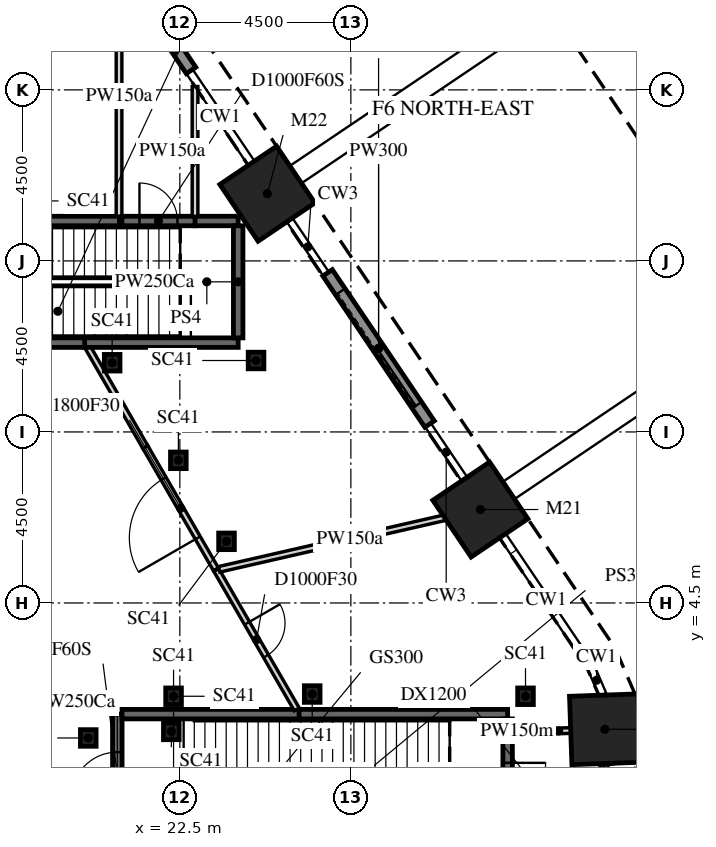
"""IFC4 building model, lengths in metres.
Left out: names, types, materials, properties, quantities, classifications, styles, units other than length and angle.
Written with IfcOpenShell. Run it as: python <this file> out.ifc"""

import sys

from ifc_helpers import new_model, si_unit, direction, frame, frame_2d, origin, origin_2d, place, context, subcontext, project, spatial, rectangle, i_section, extrude, element, fill, save


model = new_model("IFC4")
c1 = context("Model", 3, precision=1e-05, world=origin(), true_north=direction((0.0, 1.0)))
c2 = subcontext(c1, "Body", "Model", "MODEL_VIEW")
j1 = project(units=[si_unit("LENGTHUNIT", "METRE"), si_unit("PLANEANGLEUNIT", "RADIAN")], contexts=[c1])
p1 = place(None, origin())
s1 = spatial("IfcSite", under=j1, at=p1, CompositionType="ELEMENT")
p2 = place(p1, origin())
s2 = spatial("IfcBuilding", under=s1, at=p2, CompositionType="ELEMENT")
p3 = place(p2, origin())
s3 = spatial("IfcBuildingStorey", under=s2, at=p3, CompositionType="ELEMENT", Elevation=0.0)
for number, where, z_axis, x_axis in (
    (1, (33.685, 1.176, -2.1), (0.0, 0.0, 1.0), (0.035, -0.999, 0.0)),
    (2, (30.407, 6.958, -2.1), (0.0, 0.0, 1.0), (0.559, -0.829, 0.0)),
    (3, (24.802, 15.269, -2.1), (0.0, 0.0, 1.0), (0.559, -0.829, 0.0)),
):
    element("IfcColumn", number, at=place(p3, frame(where, z_axis=z_axis, x_axis=x_axis)), inside=s3, PredefinedType="COLUMN", context=c2, shape_type="SweptSolid", body=[
        extrude(rectangle(XDim=1.8, YDim=1.8, at=origin_2d()), origin(), (0.0, 0.0, 1.0), 10.85),
    ])
for number, where, z_axis, x_axis in (
    (4, (22.276, 1.121, -2.1), (0.0, 0.0, 1.0), (1.0, 0.0, 0.0)),
    (5, (20.091, 0.948, -2.1), (0.0, 0.0, 1.0), (1.0, 0.0, 0.0)),
    (6, (23.728, 6.122, -2.1), (0.0, 0.0, 1.0), (1.0, 0.0, 0.0)),
    (7, (25.983, 2.104, -2.1), (0.0, 0.0, 1.0), (1.0, 0.0, 0.0)),
    (8, (31.595, 2.045, -2.1), (0.0, 0.0, 1.0), (1.0, 0.0, 0.0)),
    (9, (24.505, 10.88, -2.1), (0.0, 0.0, 1.0), (1.0, 0.0, 0.0)),
    (10, (20.719, 10.821, -2.1), (0.0, 0.0, 1.0), (1.0, 0.0, 0.0)),
    (11, (22.461, 8.253, -2.1), (0.0, 0.0, 1.0), (1.0, 0.0, 0.0)),
    (12, (22.335, 2.045, -2.1), (0.0, 0.0, 1.0), (1.0, 0.0, 0.0)),
):
    element("IfcColumn", number, at=place(p3, frame(where, z_axis=z_axis, x_axis=x_axis)), inside=s3, PredefinedType="COLUMN", context=c2, shape_type="SweptSolid", body=[
        extrude(i_section(OverallWidth=0.412, OverallDepth=0.437, WebThickness=0.036, FlangeThickness=0.058, FilletRadius=0.015, at=origin_2d()), origin(), (0.0, 0.0, 1.0), 10.85),
    ])
p4 = place(p3, frame((29.071, 9.208, 0.0), z_axis=(0.0, 0.0, 1.0), x_axis=(-0.559199394786, 0.829033194071, 0.0)))
e13 = element("IfcWall", 13, at=p4, inside=s3, PredefinedType="SOLIDWALL", context=c2, shape_type="SweptSolid", body=[
    extrude(rectangle(XDim=4.8, YDim=0.3, at=frame_2d((2.4, 0.0))), origin(), (0.0, 0.0, 1.0), 7.823),
])
p5 = place(p4, frame((0.6, 0.0, 0.0)))
e14 = element("IfcOpeningElement", 14, at=p5, cuts=e13, PredefinedType="OPENING", context=c2, shape_type="SweptSolid", body=[
    extrude(rectangle(XDim=3.6, YDim=3.6, at=frame_2d((1.8, 1.8))), frame((0.0, 0.16, 0.0), z_axis=(0.0, -1.0, 0.0), x_axis=(1.0, 0.0, 0.0)), (0.0, 0.0, 1.0), 0.32),
])
p6 = place(p3, frame((21.453, 20.502, 0.0), z_axis=(0.0, 0.0, 1.0), x_axis=(0.559175815241, -0.829049098456, 0.0)))
e15 = element("IfcWall", 15, at=p6, inside=s3, PredefinedType="SOLIDWALL", context=c2, shape_type="SweptSolid", body=[
    extrude(rectangle(XDim=2.4, YDim=0.3, at=frame_2d((1.2, 0.0))), origin(), (0.0, 0.0, 1.0), 7.823),
])
p7 = place(p6, frame((0.6, 0.0, 0.0)))
e16 = element("IfcOpeningElement", 16, at=p7, cuts=e15, PredefinedType="OPENING", context=c2, shape_type="SweptSolid", body=[
    extrude(rectangle(XDim=1.2, YDim=2.1, at=frame_2d((0.6, 1.05))), frame((0.0, 0.16, 0.0), z_axis=(0.0, -1.0, 0.0), x_axis=(1.0, 0.0, 0.0)), (0.0, 0.0, 1.0), 0.32),
])
p8 = place(p3, frame((18.146, 14.55, 0.0), z_axis=(0.0, 0.0, 1.0), x_axis=(1.0, 0.0, 0.0)))
e17 = element("IfcWall", 17, at=p8, inside=s3, PredefinedType="PARTITIONING", context=c2, shape_type="SweptSolid", body=[
    extrude(rectangle(XDim=2.764, YDim=0.25, at=frame_2d((1.382, 0.0))), origin(), (0.0, 0.0, 1.0), 8.75),
])
p9 = place(p3, frame((20.017, 11.35, 0.0), z_axis=(0.0, 0.0, 1.0), x_axis=(-1.0, 0.0, 0.0)))
e18 = element("IfcWall", 18, at=p9, inside=s3, PredefinedType="PARTITIONING", context=c2, shape_type="SweptSolid", body=[
    extrude(rectangle(XDim=5.218, YDim=0.25, at=frame_2d((2.609, 0.0))), origin(), (0.0, 0.0, 1.0), 8.75),
])
p10 = place(p3, frame((20.855, -1.625, 0.0), z_axis=(0.0, 0.0, 1.0), x_axis=(0.0, 1.0, 0.0)))
e19 = element("IfcWall", 19, at=p10, inside=s3, PredefinedType="PARTITIONING", context=c2, shape_type="SweptSolid", body=[
    extrude(rectangle(XDim=3.2, YDim=0.25, at=frame_2d((1.6, 0.0))), origin(), (0.0, 0.0, 1.0), 8.75),
])
p11 = place(p10, frame((1.0, 0.0, 0.0)))
e20 = element("IfcOpeningElement", 20, at=p11, cuts=e19, PredefinedType="OPENING", context=c2, shape_type="SweptSolid", body=[
    extrude(rectangle(XDim=1.2, YDim=2.1, at=frame_2d((0.6, 1.05))), frame((0.0, 0.135, 0.0), z_axis=(0.0, -1.0, 0.0), x_axis=(1.0, 0.0, 0.0)), (0.0, 0.0, 1.0), 0.27),
])
p12 = place(p3, frame((20.98, 1.575, 0.0), z_axis=(0.0, 0.0, 1.0), x_axis=(1.0, 0.0, 0.0)))
e21 = element("IfcWall", 21, at=p12, inside=s3, PredefinedType="PARTITIONING", context=c2, shape_type="SweptSolid", body=[
    extrude(rectangle(XDim=4.679, YDim=0.25, at=frame_2d((2.339, 0.0))), origin(), (0.0, 0.0, 1.0), 8.75),
])
p13 = place(p3, frame((20.9, 14.675, 0.0), z_axis=(0.0, 0.0, 1.0), x_axis=(0.0, 1.0, 0.0)))
e22 = element("IfcWall", 22, at=p13, inside=s3, PredefinedType="PARTITIONING", context=c2, shape_type="SweptSolid", body=[
    extrude(rectangle(XDim=6.325, YDim=0.15, at=frame_2d((3.163, 0.0))), origin(), (0.0, 0.0, 1.0), 8.75),
])
p14 = place(p3, frame((21.603, 8.582, 0.0), z_axis=(0.0, 0.0, 1.0), x_axis=(-0.499976360077, 0.86603905187, 0.0)))
e23 = element("IfcWall", 23, at=p14, inside=s3, PredefinedType="PARTITIONING", context=c2, shape_type="SweptSolid", body=[
    extrude(rectangle(XDim=3.052, YDim=0.15, at=frame_2d((1.526, 0.0))), origin(), (0.0, 0.0, 1.0), 8.75),
])
p15 = place(p3, frame((22.89, 14.55, 0.0), z_axis=(0.0, 0.0, 1.0), x_axis=(1.0, 0.0, 0.0)))
e24 = element("IfcWall", 24, at=p15, inside=s3, PredefinedType="PARTITIONING", context=c2, shape_type="SweptSolid", body=[
    extrude(rectangle(XDim=1.145, YDim=0.25, at=frame_2d((0.573, 0.0))), origin(), (0.0, 0.0, 1.0), 8.75),
])
p16 = place(p3, frame((20.975, 14.55, 0.0), z_axis=(0.0, 0.0, 1.0), x_axis=(1.0, 0.0, 0.0)))
e25 = element("IfcWall", 25, at=p16, inside=s3, PredefinedType="PARTITIONING", context=c2, shape_type="SweptSolid", body=[
    extrude(rectangle(XDim=1.925, YDim=0.25, at=frame_2d((0.962, 0.0))), origin(), (0.0, 0.0, 1.0), 8.75),
])
p17 = place(p16, frame((0.462, 0.0, 0.0)))
e26 = element("IfcOpeningElement", 26, at=p17, cuts=e25, PredefinedType="OPENING", context=c2, shape_type="SweptSolid", body=[
    extrude(rectangle(XDim=1.0, YDim=2.1, at=frame_2d((0.5, 1.05))), frame((0.0, 0.135, 0.0), z_axis=(0.0, -1.0, 0.0), x_axis=(1.0, 0.0, 0.0)), (0.0, 0.0, 1.0), 0.27),
])
p18 = place(p3, frame((22.9, 18.089, 0.0), z_axis=(0.0, 0.0, 1.0), x_axis=(0.0, -1.0, 0.0)))
e27 = element("IfcWall", 27, at=p18, inside=s3, PredefinedType="PARTITIONING", context=c2, shape_type="SweptSolid", body=[
    extrude(rectangle(XDim=3.414, YDim=0.15, at=frame_2d((1.707, 0.0))), origin(), (0.0, 0.0, 1.0), 8.75),
])
p19 = place(p3, frame((23.449, 5.386, 0.0), z_axis=(0.0, 0.0, 1.0), x_axis=(-0.500058396869, 0.865991685711, 0.0)))
e28 = element("IfcWall", 28, at=p19, inside=s3, PredefinedType="PARTITIONING", context=c2, shape_type="SweptSolid", body=[
    extrude(rectangle(XDim=3.711, YDim=0.15, at=frame_2d((1.856, 0.0))), origin(), (0.0, 0.0, 1.0), 8.75),
])
p20 = place(p19, frame((0.956, 0.0, 0.0)))
e29 = element("IfcOpeningElement", 29, at=p20, cuts=e28, PredefinedType="OPENING", context=c2, shape_type="SweptSolid", body=[
    extrude(rectangle(XDim=1.8, YDim=2.1, at=frame_2d((0.9, 1.05))), frame((0.0, 0.085, 0.0), z_axis=(0.0, -1.0, 0.0), x_axis=(1.0, 0.0, 0.0)), (0.0, 0.0, 1.0), 0.17),
])
p21 = place(p3, frame((24.035, 11.35, 0.0), z_axis=(0.0, 0.0, 1.0), x_axis=(-1.0, 0.0, 0.0)))
e30 = element("IfcWall", 30, at=p21, inside=s3, PredefinedType="PARTITIONING", context=c2, shape_type="SweptSolid", body=[
    extrude(rectangle(XDim=4.04, YDim=0.25, at=frame_2d((2.02, 0.0))), origin(), (0.0, 0.0, 1.0), 8.75),
])
p22 = place(p3, frame((24.035, 14.425, 0.0), z_axis=(0.0, 0.0, 1.0), x_axis=(0.0, -1.0, 0.0)))
e31 = element("IfcWall", 31, at=p22, inside=s3, PredefinedType="PARTITIONING", context=c2, shape_type="SweptSolid", body=[
    extrude(rectangle(XDim=2.95, YDim=0.25, at=frame_2d((1.475, 0.0))), origin(), (0.0, 0.0, 1.0), 8.75),
])
p23 = place(p3, frame((25.637, 1.575, 0.0), z_axis=(0.0, 0.0, 1.0), x_axis=(1.0, 0.0, 0.0)))
e32 = element("IfcWall", 32, at=p23, inside=s3, PredefinedType="PARTITIONING", context=c2, shape_type="SweptSolid", body=[
    extrude(rectangle(XDim=5.488, YDim=0.25, at=frame_2d((2.744, 0.0))), origin(), (0.0, 0.0, 1.0), 8.75),
])
p24 = place(p3, frame((23.459, 5.368, 0.0), z_axis=(0.0, 0.0, 1.0), x_axis=(0.500038455881, -0.866003200133, 0.0)))
e33 = element("IfcWall", 33, at=p24, inside=s3, PredefinedType="PARTITIONING", context=c2, shape_type="SweptSolid", body=[
    extrude(rectangle(XDim=4.236, YDim=0.15, at=frame_2d((2.118, 0.0))), origin(), (0.0, 0.0, 1.0), 8.75),
])
p25 = place(p24, frame((1.618, 0.0, 0.0)))
e34 = element("IfcOpeningElement", 34, at=p25, cuts=e33, PredefinedType="OPENING", context=c2, shape_type="SweptSolid", body=[
    extrude(rectangle(XDim=1.0, YDim=2.1, at=frame_2d((0.5, 1.05))), frame((0.0, 0.085, 0.0), z_axis=(0.0, -1.0, 0.0), x_axis=(1.0, 0.0, 0.0)), (0.0, 0.0, 1.0), 0.17),
])
p26 = place(p3, frame((30.407, 6.958, 0.0), z_axis=(0.0, 0.0, 1.0), x_axis=(-0.974801082726, -0.223075881967, 0.0)))
e35 = element("IfcWall", 35, at=p26, inside=s3, PredefinedType="PARTITIONING", context=c2, shape_type="SweptSolid", body=[
    extrude(rectangle(XDim=7.049, YDim=0.15, at=frame_2d((3.525, 0.0))), origin(), (0.0, 0.0, 1.0), 8.75),
])
p27 = place(p3, frame((31.125, 1.087, 0.0), z_axis=(0.0, 0.0, 1.0), x_axis=(0.0, -1.0, 0.0)))
e36 = element("IfcWall", 36, at=p27, inside=s3, PredefinedType="PARTITIONING", context=c2, shape_type="SweptSolid", body=[
    extrude(rectangle(XDim=2.587, YDim=0.25, at=frame_2d((1.293, 0.0))), origin(), (0.0, 0.0, 1.0), 8.75),
])
p28 = place(p27, frame((0.793, 0.0, 0.0)))
e37 = element("IfcOpeningElement", 37, at=p28, cuts=e36, PredefinedType="OPENING", context=c2, shape_type="SweptSolid", body=[
    extrude(rectangle(XDim=1.0, YDim=2.1, at=frame_2d((0.5, 1.05))), frame((0.0, 0.135, 0.0), z_axis=(0.0, -1.0, 0.0), x_axis=(1.0, 0.0, 0.0)), (0.0, 0.0, 1.0), 0.27),
])
p29 = place(p3, frame((31.25, 1.091, 0.0), z_axis=(0.0, 0.0, 1.0), x_axis=(0.999395360939, 0.034769419515, 0.0)))
e38 = element("IfcWall", 38, at=p29, inside=s3, PredefinedType="PARTITIONING", context=c2, shape_type="SweptSolid", body=[
    extrude(rectangle(XDim=2.437, YDim=0.15, at=frame_2d((1.218, 0.0))), origin(), (0.0, 0.0, 1.0), 8.297),
])
p30 = place(p3, frame((31.125, 1.45, 0.0), z_axis=(0.0, 0.0, 1.0), x_axis=(0.0, -1.0, 0.0)))
e39 = element("IfcWall", 39, at=p30, inside=s3, PredefinedType="PARTITIONING", context=c2, shape_type="SweptSolid", body=[
    extrude(rectangle(XDim=0.373, YDim=0.25, at=frame_2d((0.187, 0.0))), origin(), (0.0, 0.0, 1.0), 8.75),
])
p31 = place(p5, frame((0.0, -0.025, 0.0)))
e40 = element("IfcDoor", 40, at=p31, inside=s3, OperationType="DOUBLE_DOOR_SLIDING", PredefinedType="DOOR", context=c2, shape_type="SweptSolid", body=[
    extrude(rectangle(XDim=3.6, YDim=3.6, at=frame_2d((1.8, 1.8))), frame((0.0, 0.025, 0.0), z_axis=(0.0, -1.0, 0.0), x_axis=(1.0, 0.0, 0.0)), (0.0, 0.0, 1.0), 0.05),
])
fill(e14, e40)
p32 = place(p11, origin())
e41 = element("IfcDoor", 41, at=p32, inside=s3, OperationType="SINGLE_SWING_LEFT", PredefinedType="DOOR", context=c2, shape_type="SweptSolid", body=[
    extrude(rectangle(XDim=1.2, YDim=2.1, at=frame_2d((0.6, 1.05))), frame((0.0, 0.025, 0.0), z_axis=(0.0, -1.0, 0.0), x_axis=(1.0, 0.0, 0.0)), (0.0, 0.0, 1.0), 0.05),
])
fill(e20, e41)
p33 = place(p17, origin())
e42 = element("IfcDoor", 42, at=p33, inside=s3, OperationType="SINGLE_SWING_LEFT", PredefinedType="DOOR", context=c2, shape_type="SweptSolid", body=[
    extrude(rectangle(XDim=1.0, YDim=2.1, at=frame_2d((0.5, 1.05))), frame((0.0, 0.025, 0.0), z_axis=(0.0, -1.0, 0.0), x_axis=(1.0, 0.0, 0.0)), (0.0, 0.0, 1.0), 0.05),
])
fill(e26, e42)
p34 = place(p20, origin())
e43 = element("IfcDoor", 43, at=p34, inside=s3, OperationType="DOUBLE_DOOR_SINGLE_SWING", PredefinedType="DOOR", context=c2, shape_type="SweptSolid", body=[
    extrude(rectangle(XDim=1.8, YDim=2.1, at=frame_2d((0.9, 1.05))), frame((0.0, 0.025, 0.0), z_axis=(0.0, -1.0, 0.0), x_axis=(1.0, 0.0, 0.0)), (0.0, 0.0, 1.0), 0.05),
])
fill(e29, e43)
p35 = place(p25, origin())
e44 = element("IfcDoor", 44, at=p35, inside=s3, OperationType="SINGLE_SWING_RIGHT", PredefinedType="DOOR", context=c2, shape_type="SweptSolid", body=[
    extrude(rectangle(XDim=1.0, YDim=2.1, at=frame_2d((0.5, 1.05))), frame((0.0, 0.025, 0.0), z_axis=(0.0, -1.0, 0.0), x_axis=(1.0, 0.0, 0.0)), (0.0, 0.0, 1.0), 0.05),
])
fill(e34, e44)
p36 = place(p28, origin())
e45 = element("IfcDoor", 45, at=p36, inside=s3, OperationType="SINGLE_SWING_RIGHT", PredefinedType="DOOR", context=c2, shape_type="SweptSolid", body=[
    extrude(rectangle(XDim=1.0, YDim=2.1, at=frame_2d((0.5, 1.05))), frame((0.0, 0.025, 0.0), z_axis=(0.0, -1.0, 0.0), x_axis=(1.0, 0.0, 0.0)), (0.0, 0.0, 1.0), 0.05),
])
fill(e37, e45)
save(model, sys.argv[1])
